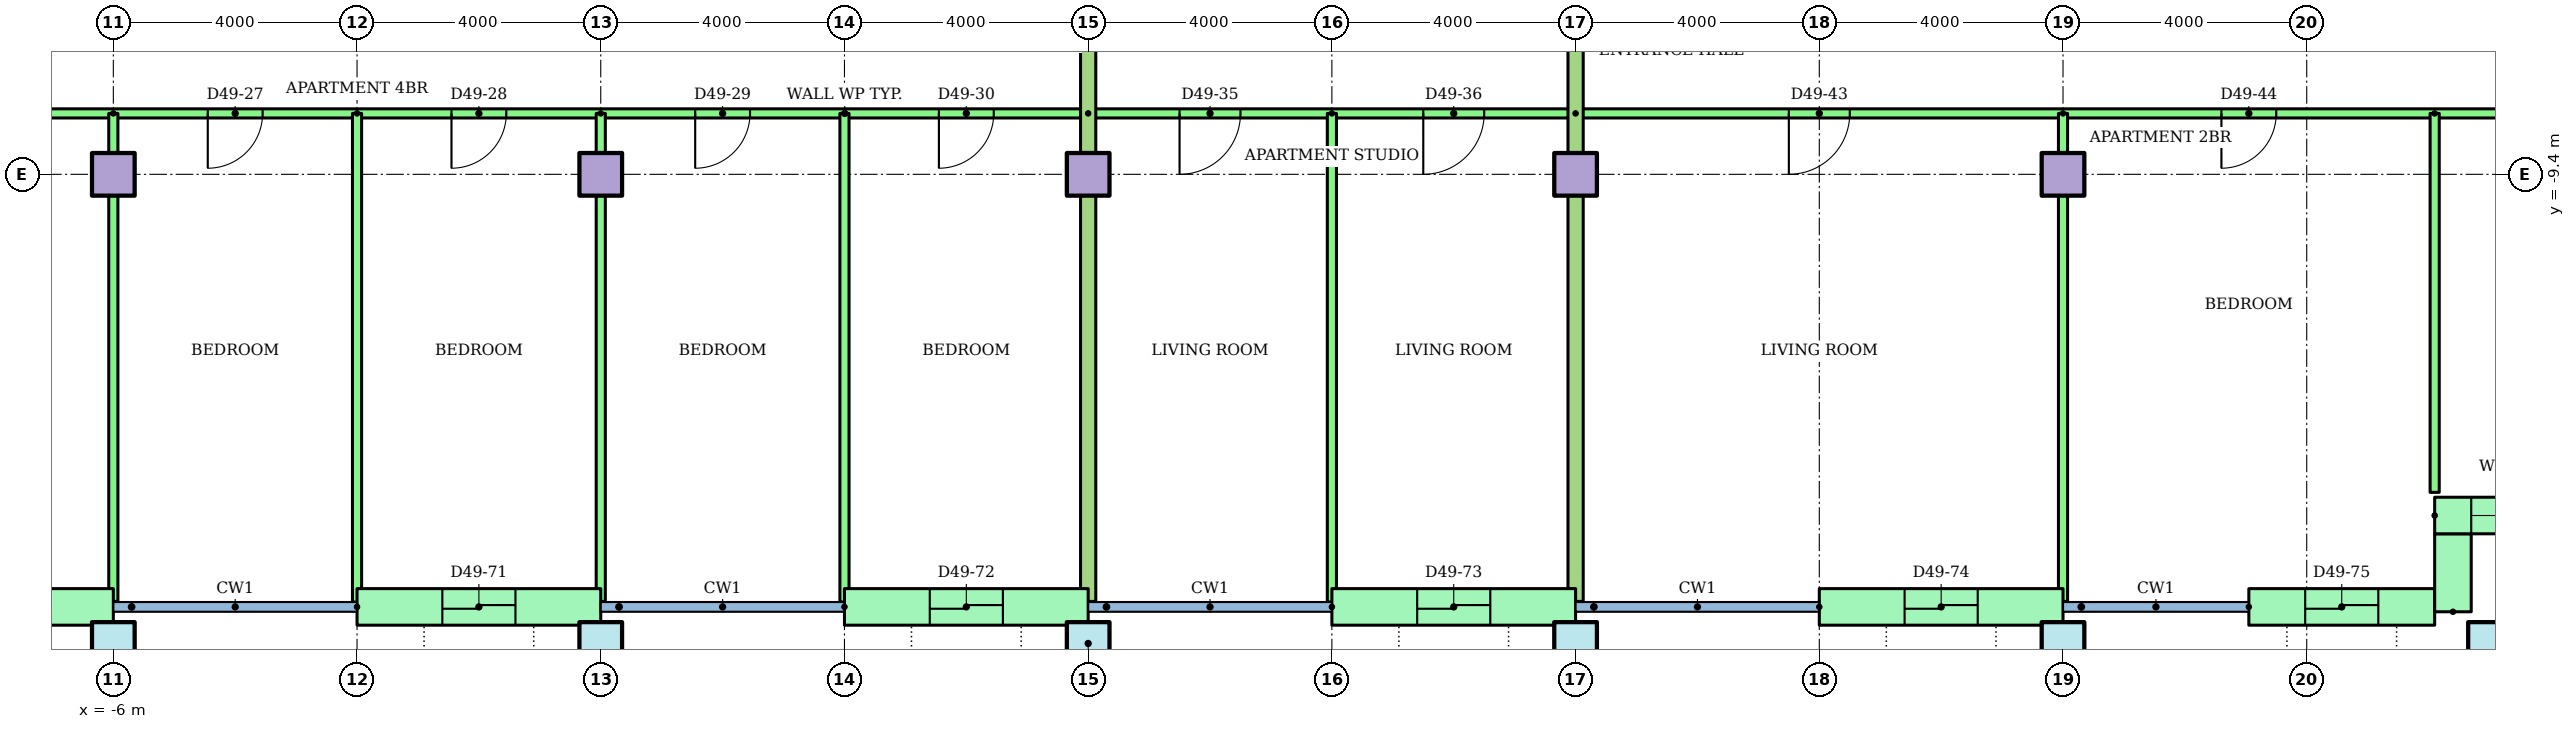
"""IFC4 building model, lengths in metres.
Left out: names, types, materials, properties, quantities, classifications, styles, units other than length and angle.
Written with IfcOpenShell. Run it as: python <this file> out.ifc"""

import sys

from ifc_helpers import new_model, si_unit, direction, frame, frame_2d, origin, origin_2d, place, context, subcontext, project, spatial, rectangle, hollow_rectangle, extrude, element, fill, save


model = new_model("IFC4")
c1 = context("Model", 3, precision=1e-05, world=origin(), true_north=direction((0.0, 1.0)))
c2 = subcontext(c1, "Body", "Model", "MODEL_VIEW")
j1 = project(units=[si_unit("LENGTHUNIT", "METRE"), si_unit("PLANEANGLEUNIT", "RADIAN")], contexts=[c1])
p1 = place(None, origin())
s1 = spatial("IfcSite", under=j1, at=p1, CompositionType="ELEMENT")
p2 = place(p1, origin())
s2 = spatial("IfcBuilding", under=s1, at=p2, CompositionType="ELEMENT")
p3 = place(p2, frame((0.0, 0.0, 187.7)))
s3 = spatial("IfcBuildingStorey", under=s2, at=p3, CompositionType="ELEMENT", Elevation=187.7)
for number, where in (
    (1, (-6.0, -17.1, 0.0)),
    (2, (2.0, -17.1, 0.0)),
    (3, (10.0, -17.1, 0.0)),
    (4, (18.0, -17.1, 0.0)),
    (5, (26.0, -17.1, 0.0)),
    (6, (33.0, -17.1, 0.0)),
):
    element("IfcColumn", number, at=place(p3, frame(where)), inside=s3, PredefinedType="COLUMN", context=c2, shape_type="SweptSolid", body=[
        extrude(hollow_rectangle(XDim=0.7, YDim=0.7, WallThickness=0.036, at=origin_2d()), origin(), (0.0, 0.0, 1.0), 3.2),
    ])
for number, where in (
    (7, (-6.0, -9.4, 0.0)),
    (8, (2.0, -9.4, 0.0)),
    (9, (10.0, -9.4, 0.0)),
    (10, (18.0, -9.4, 0.0)),
    (11, (26.0, -9.4, 0.0)),
):
    element("IfcColumn", number, at=place(p3, frame(where)), inside=s3, PredefinedType="COLUMN", context=c2, shape_type="SweptSolid", body=[
        extrude(rectangle(XDim=0.7, YDim=0.7, at=origin_2d()), origin(), (0.0, 0.0, 1.0), 3.2),
    ])
p4 = place(p3, frame((-10.0, -16.5, 0.0)))
e12 = element("IfcWall", 12, at=p4, inside=s3, PredefinedType="STANDARD", context=c2, shape_type="SweptSolid", body=[
    extrude(rectangle(XDim=4.0, YDim=0.6, at=frame_2d((2.0, 0.0))), origin(), (0.0, 0.0, 1.0), 2.92),
])
p5 = place(p4, frame((1.4, 0.0, 0.0)))
e13 = element("IfcOpeningElement", 13, at=p5, cuts=e12, PredefinedType="OPENING", context=c2, shape_type="SweptSolid", body=[
    extrude(rectangle(XDim=1.2, YDim=2.1, at=frame_2d((0.6, 1.05))), frame((0.0, 0.31, 0.0), z_axis=(0.0, -1.0, 0.0), x_axis=(1.0, 0.0, 0.0)), (0.0, 0.0, 1.0), 0.62),
])
p6 = place(p3, frame((-2.0, -16.5, 0.0)))
e14 = element("IfcWall", 14, at=p6, inside=s3, PredefinedType="STANDARD", context=c2, shape_type="SweptSolid", body=[
    extrude(rectangle(XDim=4.0, YDim=0.6, at=frame_2d((2.0, 0.0))), origin(), (0.0, 0.0, 1.0), 2.92),
])
p7 = place(p6, frame((1.4, 0.0, 0.0)))
e15 = element("IfcOpeningElement", 15, at=p7, cuts=e14, PredefinedType="OPENING", context=c2, shape_type="SweptSolid", body=[
    extrude(rectangle(XDim=1.2, YDim=2.1, at=frame_2d((0.6, 1.05))), frame((0.0, 0.31, 0.0), z_axis=(0.0, -1.0, 0.0), x_axis=(1.0, 0.0, 0.0)), (0.0, 0.0, 1.0), 0.62),
])
p8 = place(p3, frame((6.0, -16.5, 0.0)))
e16 = element("IfcWall", 16, at=p8, inside=s3, PredefinedType="STANDARD", context=c2, shape_type="SweptSolid", body=[
    extrude(rectangle(XDim=4.0, YDim=0.6, at=frame_2d((2.0, 0.0))), origin(), (0.0, 0.0, 1.0), 2.92),
])
p9 = place(p8, frame((1.4, 0.0, 0.0)))
e17 = element("IfcOpeningElement", 17, at=p9, cuts=e16, PredefinedType="OPENING", context=c2, shape_type="SweptSolid", body=[
    extrude(rectangle(XDim=1.2, YDim=2.1, at=frame_2d((0.6, 1.05))), frame((0.0, 0.31, 0.0), z_axis=(0.0, -1.0, 0.0), x_axis=(1.0, 0.0, 0.0)), (0.0, 0.0, 1.0), 0.62),
])
p10 = place(p3, frame((14.0, -16.5, 0.0)))
e18 = element("IfcWall", 18, at=p10, inside=s3, PredefinedType="STANDARD", context=c2, shape_type="SweptSolid", body=[
    extrude(rectangle(XDim=4.0, YDim=0.6, at=frame_2d((2.0, 0.0))), origin(), (0.0, 0.0, 1.0), 2.92),
])
p11 = place(p10, frame((1.4, 0.0, 0.0)))
e19 = element("IfcOpeningElement", 19, at=p11, cuts=e18, PredefinedType="OPENING", context=c2, shape_type="SweptSolid", body=[
    extrude(rectangle(XDim=1.2, YDim=2.1, at=frame_2d((0.6, 1.05))), frame((0.0, 0.31, 0.0), z_axis=(0.0, -1.0, 0.0), x_axis=(1.0, 0.0, 0.0)), (0.0, 0.0, 1.0), 0.62),
])
p12 = place(p3, frame((22.0, -16.5, 0.0)))
e20 = element("IfcWall", 20, at=p12, inside=s3, PredefinedType="STANDARD", context=c2, shape_type="SweptSolid", body=[
    extrude(rectangle(XDim=4.0, YDim=0.6, at=frame_2d((2.0, 0.0))), origin(), (0.0, 0.0, 1.0), 2.92),
])
p13 = place(p12, frame((1.4, 0.0, 0.0)))
e21 = element("IfcOpeningElement", 21, at=p13, cuts=e20, PredefinedType="OPENING", context=c2, shape_type="SweptSolid", body=[
    extrude(rectangle(XDim=1.2, YDim=2.1, at=frame_2d((0.6, 1.05))), frame((0.0, 0.31, 0.0), z_axis=(0.0, -1.0, 0.0), x_axis=(1.0, 0.0, 0.0)), (0.0, 0.0, 1.0), 0.62),
])
p14 = place(p3, frame((29.05, -16.5, 0.0)))
e22 = element("IfcWall", 22, at=p14, inside=s3, PredefinedType="STANDARD", context=c2, shape_type="SweptSolid", body=[
    extrude(rectangle(XDim=3.05, YDim=0.6, at=frame_2d((1.525, 0.0))), origin(), (0.0, 0.0, 1.0), 2.92),
])
p15 = place(p14, frame((0.925, 0.0, 0.0)))
e23 = element("IfcOpeningElement", 23, at=p15, cuts=e22, PredefinedType="OPENING", context=c2, shape_type="SweptSolid", body=[
    extrude(rectangle(XDim=1.2, YDim=2.1, at=frame_2d((0.6, 1.05))), frame((0.0, 0.31, 0.0), z_axis=(0.0, -1.0, 0.0), x_axis=(1.0, 0.0, 0.0)), (0.0, 0.0, 1.0), 0.62),
])
p16 = place(p3, frame((32.4, -16.58, 0.0), z_axis=(0.0, 0.0, 1.0), x_axis=(0.0, 1.0, 0.0)))
e24 = element("IfcWall", 24, at=p16, inside=s3, PredefinedType="STANDARD", context=c2, shape_type="SweptSolid", body=[
    extrude(rectangle(XDim=1.28, YDim=0.6, at=frame_2d((0.64, 0.0))), origin(), (0.0, 0.0, 1.0), 2.92),
])
p17 = place(p3, frame((32.1, -15.0, 0.0)))
e25 = element("IfcWall", 25, at=p17, inside=s3, PredefinedType="STANDARD", context=c2, shape_type="SweptSolid", body=[
    extrude(rectangle(XDim=2.1, YDim=0.6, at=frame_2d((1.05, 0.0))), origin(), (0.0, 0.0, 1.0), 2.92),
])
p18 = place(p17, frame((0.6, 0.0, 0.9)))
e26 = element("IfcOpeningElement", 26, at=p18, cuts=e25, PredefinedType="OPENING", context=c2, shape_type="SweptSolid", body=[
    extrude(rectangle(XDim=0.9, YDim=1.5, at=frame_2d((0.45, 0.75))), frame((0.0, 0.31, 0.0), z_axis=(0.0, -1.0, 0.0), x_axis=(1.0, 0.0, 0.0)), (0.0, 0.0, 1.0), 0.62),
])
p19 = place(p3, frame((10.0, -8.4, 0.0), z_axis=(0.0, 0.0, 1.0), x_axis=(-1.0, 0.0, 0.0)))
e27 = element("IfcWall", 27, at=p19, inside=s3, PredefinedType="PARTITIONING", context=c2, shape_type="SweptSolid", body=[
    extrude(rectangle(XDim=24.0, YDim=0.15, at=frame_2d((12.0, 0.0))), origin(), (0.0, 0.0, 1.0), 2.4),
])
p20 = place(p19, frame((19.5, 0.0, 0.0)))
e28 = element("IfcOpeningElement", 28, at=p20, cuts=e27, PredefinedType="OPENING", context=c2, shape_type="SweptSolid", body=[
    extrude(rectangle(XDim=1.0, YDim=2.1, at=frame_2d((0.5, 1.05))), frame((0.0, 0.085, 0.0), z_axis=(0.0, -1.0, 0.0), x_axis=(1.0, 0.0, 0.0)), (0.0, 0.0, 1.0), 0.17),
])
p21 = place(p19, frame((13.55, 0.0, 0.0)))
e29 = element("IfcOpeningElement", 29, at=p21, cuts=e27, PredefinedType="OPENING", context=c2, shape_type="SweptSolid", body=[
    extrude(rectangle(XDim=0.9, YDim=2.1, at=frame_2d((0.45, 1.05))), frame((0.0, 0.085, 0.0), z_axis=(0.0, -1.0, 0.0), x_axis=(1.0, 0.0, 0.0)), (0.0, 0.0, 1.0), 0.17),
])
p22 = place(p19, frame((9.55, 0.0, 0.0)))
e30 = element("IfcOpeningElement", 30, at=p22, cuts=e27, PredefinedType="OPENING", context=c2, shape_type="SweptSolid", body=[
    extrude(rectangle(XDim=0.9, YDim=2.1, at=frame_2d((0.45, 1.05))), frame((0.0, 0.085, 0.0), z_axis=(0.0, -1.0, 0.0), x_axis=(1.0, 0.0, 0.0)), (0.0, 0.0, 1.0), 0.17),
])
p23 = place(p19, frame((5.55, 0.0, 0.0)))
e31 = element("IfcOpeningElement", 31, at=p23, cuts=e27, PredefinedType="OPENING", context=c2, shape_type="SweptSolid", body=[
    extrude(rectangle(XDim=0.9, YDim=2.1, at=frame_2d((0.45, 1.05))), frame((0.0, 0.085, 0.0), z_axis=(0.0, -1.0, 0.0), x_axis=(1.0, 0.0, 0.0)), (0.0, 0.0, 1.0), 0.17),
])
p24 = place(p19, frame((1.55, 0.0, 0.0)))
e32 = element("IfcOpeningElement", 32, at=p24, cuts=e27, PredefinedType="OPENING", context=c2, shape_type="SweptSolid", body=[
    extrude(rectangle(XDim=0.9, YDim=2.1, at=frame_2d((0.45, 1.05))), frame((0.0, 0.085, 0.0), z_axis=(0.0, -1.0, 0.0), x_axis=(1.0, 0.0, 0.0)), (0.0, 0.0, 1.0), 0.17),
])
p25 = place(p3, frame((-6.0, -8.4, 0.0), z_axis=(0.0, 0.0, 1.0), x_axis=(0.0, -1.0, 0.0)))
e33 = element("IfcWall", 33, at=p25, inside=s3, PredefinedType="PARTITIONING", context=c2, shape_type="SweptSolid", body=[
    extrude(rectangle(XDim=8.01, YDim=0.15, at=frame_2d((4.005, 0.0))), origin(), (0.0, 0.0, 1.0), 2.4),
])
p26 = place(p3, frame((-2.0, -8.4, 0.0), z_axis=(0.0, 0.0, 1.0), x_axis=(0.0, -1.0, 0.0)))
e34 = element("IfcWall", 34, at=p26, inside=s3, PredefinedType="PARTITIONING", context=c2, shape_type="SweptSolid", body=[
    extrude(rectangle(XDim=8.021, YDim=0.15, at=frame_2d((4.01, 0.0))), origin(), (0.0, 0.0, 1.0), 2.4),
])
p27 = place(p3, frame((2.0, -8.4, 0.0), z_axis=(0.0, 0.0, 1.0), x_axis=(0.0, -1.0, 0.0)))
e35 = element("IfcWall", 35, at=p27, inside=s3, PredefinedType="PARTITIONING", context=c2, shape_type="SweptSolid", body=[
    extrude(rectangle(XDim=8.01, YDim=0.15, at=frame_2d((4.005, 0.0))), origin(), (0.0, 0.0, 1.0), 2.4),
])
p28 = place(p3, frame((6.0, -8.4, 0.0), z_axis=(0.0, 0.0, 1.0), x_axis=(0.0, -1.0, 0.0)))
e36 = element("IfcWall", 36, at=p28, inside=s3, PredefinedType="PARTITIONING", context=c2, shape_type="SweptSolid", body=[
    extrude(rectangle(XDim=8.021, YDim=0.15, at=frame_2d((4.01, 0.0))), origin(), (0.0, 0.0, 1.0), 2.4),
])
p29 = place(p3, frame((18.0, -8.4, 0.0), z_axis=(0.0, 0.0, 1.0), x_axis=(-1.0, 0.0, 0.0)))
e37 = element("IfcWall", 37, at=p29, inside=s3, PredefinedType="PARTITIONING", context=c2, shape_type="SweptSolid", body=[
    extrude(rectangle(XDim=8.0, YDim=0.15, at=frame_2d((4.0, 0.0))), origin(), (0.0, 0.0, 1.0), 2.4),
])
p30 = place(p29, frame((5.5, 0.0, 0.0)))
e38 = element("IfcOpeningElement", 38, at=p30, cuts=e37, PredefinedType="OPENING", context=c2, shape_type="SweptSolid", body=[
    extrude(rectangle(XDim=1.0, YDim=2.1, at=frame_2d((0.5, 1.05))), frame((0.0, 0.085, 0.0), z_axis=(0.0, -1.0, 0.0), x_axis=(1.0, 0.0, 0.0)), (0.0, 0.0, 1.0), 0.17),
])
p31 = place(p29, frame((1.5, 0.0, 0.0)))
e39 = element("IfcOpeningElement", 39, at=p31, cuts=e37, PredefinedType="OPENING", context=c2, shape_type="SweptSolid", body=[
    extrude(rectangle(XDim=1.0, YDim=2.1, at=frame_2d((0.5, 1.05))), frame((0.0, 0.085, 0.0), z_axis=(0.0, -1.0, 0.0), x_axis=(1.0, 0.0, 0.0)), (0.0, 0.0, 1.0), 0.17),
])
p32 = place(p3, frame((14.0, -8.4, 0.0), z_axis=(0.0, 0.0, 1.0), x_axis=(0.0, -1.0, 0.0)))
e40 = element("IfcWall", 40, at=p32, inside=s3, PredefinedType="PARTITIONING", context=c2, shape_type="SweptSolid", body=[
    extrude(rectangle(XDim=8.021, YDim=0.15, at=frame_2d((4.01, 0.0))), origin(), (0.0, 0.0, 1.0), 2.4),
])
p33 = place(p3, frame((10.0, -1.4, 0.0), z_axis=(0.0, 0.0, 1.0), x_axis=(0.0, -1.0, 0.0)))
e41 = element("IfcWall", 41, at=p33, inside=s3, PredefinedType="PARTITIONING", context=c2, shape_type="SweptSolid", body=[
    extrude(rectangle(XDim=15.01, YDim=0.25, at=frame_2d((7.505, 0.0))), origin(), (0.0, 0.0, 1.0), 2.4),
])
p34 = place(p3, frame((36.82, -8.4, 0.0), z_axis=(0.0, 0.0, 1.0), x_axis=(-1.0, 0.0, 0.0)))
e42 = element("IfcWall", 42, at=p34, inside=s3, PredefinedType="PARTITIONING", context=c2, shape_type="SweptSolid", body=[
    extrude(rectangle(XDim=18.82, YDim=0.15, at=frame_2d((9.41, 0.0))), origin(), (0.0, 0.0, 1.0), 2.4),
])
p35 = place(p34, frame((14.32, 0.0, 0.0)))
e43 = element("IfcOpeningElement", 43, at=p35, cuts=e42, PredefinedType="OPENING", context=c2, shape_type="SweptSolid", body=[
    extrude(rectangle(XDim=1.0, YDim=2.1, at=frame_2d((0.5, 1.05))), frame((0.0, 0.085, 0.0), z_axis=(0.0, -1.0, 0.0), x_axis=(1.0, 0.0, 0.0)), (0.0, 0.0, 1.0), 0.17),
])
p36 = place(p34, frame((7.32, 0.0, 0.0)))
e44 = element("IfcOpeningElement", 44, at=p36, cuts=e42, PredefinedType="OPENING", context=c2, shape_type="SweptSolid", body=[
    extrude(rectangle(XDim=0.9, YDim=2.1, at=frame_2d((0.45, 1.05))), frame((0.0, 0.085, 0.0), z_axis=(0.0, -1.0, 0.0), x_axis=(1.0, 0.0, 0.0)), (0.0, 0.0, 1.0), 0.17),
])
p37 = place(p34, frame((1.373, 0.0, 0.0)))
e45 = element("IfcOpeningElement", 45, at=p37, cuts=e42, PredefinedType="OPENING", context=c2, shape_type="SweptSolid", body=[
    extrude(rectangle(XDim=0.9, YDim=2.1, at=frame_2d((0.45, 1.05))), frame((0.0, 0.085, 0.0), z_axis=(0.0, -1.0, 0.0), x_axis=(1.0, 0.0, 0.0)), (0.0, 0.0, 1.0), 0.17),
])
p38 = place(p3, frame((26.0, -8.4, 0.0), z_axis=(0.0, 0.0, 1.0), x_axis=(0.0, -1.0, 0.0)))
e46 = element("IfcWall", 46, at=p38, inside=s3, PredefinedType="PARTITIONING", context=c2, shape_type="SweptSolid", body=[
    extrude(rectangle(XDim=8.01, YDim=0.15, at=frame_2d((4.005, 0.0))), origin(), (0.0, 0.0, 1.0), 2.4),
])
p39 = place(p3, frame((32.1, -8.4, 0.0), z_axis=(0.0, 0.0, 1.0), x_axis=(0.0, -1.0, 0.0)))
e47 = element("IfcWall", 47, at=p39, inside=s3, PredefinedType="PARTITIONING", context=c2, shape_type="SweptSolid", body=[
    extrude(rectangle(XDim=6.22, YDim=0.15, at=frame_2d((3.11, 0.0))), origin(), (0.0, 0.0, 1.0), 2.4),
])
p40 = place(p3, frame((18.0, -1.4, 0.0), z_axis=(0.0, 0.0, 1.0), x_axis=(0.0, -1.0, 0.0)))
e48 = element("IfcWall", 48, at=p40, inside=s3, PredefinedType="PARTITIONING", context=c2, shape_type="SweptSolid", body=[
    extrude(rectangle(XDim=15.01, YDim=0.25, at=frame_2d((7.505, 0.0))), origin(), (0.0, 0.0, 1.0), 2.4),
])
p41 = place(p18, origin())
e49 = element("IfcWindow", 49, at=p41, inside=s3, PartitioningType="SINGLE_PANEL", PredefinedType="WINDOW", context=c2, shape_type="SweptSolid", body=[
    extrude(rectangle(XDim=0.9, YDim=1.5, at=frame_2d((0.45, 0.75))), frame((0.0, 0.03, 0.0), z_axis=(0.0, -1.0, 0.0), x_axis=(1.0, 0.0, 0.0)), (0.0, 0.0, 1.0), 0.06),
])
fill(e26, e49)
p42 = place(p21, origin())
e50 = element("IfcDoor", 50, at=p42, inside=s3, OperationType="SINGLE_SWING_RIGHT", PredefinedType="DOOR", context=c2, shape_type="SweptSolid", body=[
    extrude(rectangle(XDim=0.9, YDim=2.1, at=frame_2d((0.45, 1.05))), frame((0.0, 0.025, 0.0), z_axis=(0.0, -1.0, 0.0), x_axis=(1.0, 0.0, 0.0)), (0.0, 0.0, 1.0), 0.05),
])
fill(e29, e50)
p43 = place(p22, origin())
e51 = element("IfcDoor", 51, at=p43, inside=s3, OperationType="SINGLE_SWING_RIGHT", PredefinedType="DOOR", context=c2, shape_type="SweptSolid", body=[
    extrude(rectangle(XDim=0.9, YDim=2.1, at=frame_2d((0.45, 1.05))), frame((0.0, 0.025, 0.0), z_axis=(0.0, -1.0, 0.0), x_axis=(1.0, 0.0, 0.0)), (0.0, 0.0, 1.0), 0.05),
])
fill(e30, e51)
p44 = place(p23, origin())
e52 = element("IfcDoor", 52, at=p44, inside=s3, OperationType="SINGLE_SWING_RIGHT", PredefinedType="DOOR", context=c2, shape_type="SweptSolid", body=[
    extrude(rectangle(XDim=0.9, YDim=2.1, at=frame_2d((0.45, 1.05))), frame((0.0, 0.025, 0.0), z_axis=(0.0, -1.0, 0.0), x_axis=(1.0, 0.0, 0.0)), (0.0, 0.0, 1.0), 0.05),
])
fill(e31, e52)
p45 = place(p24, origin())
e53 = element("IfcDoor", 53, at=p45, inside=s3, OperationType="SINGLE_SWING_RIGHT", PredefinedType="DOOR", context=c2, shape_type="SweptSolid", body=[
    extrude(rectangle(XDim=0.9, YDim=2.1, at=frame_2d((0.45, 1.05))), frame((0.0, 0.025, 0.0), z_axis=(0.0, -1.0, 0.0), x_axis=(1.0, 0.0, 0.0)), (0.0, 0.0, 1.0), 0.05),
])
fill(e32, e53)
p46 = place(p30, origin())
e54 = element("IfcDoor", 54, at=p46, inside=s3, OperationType="SINGLE_SWING_RIGHT", PredefinedType="DOOR", context=c2, shape_type="SweptSolid", body=[
    extrude(rectangle(XDim=1.0, YDim=2.1, at=frame_2d((0.5, 1.05))), frame((0.0, 0.025, 0.0), z_axis=(0.0, -1.0, 0.0), x_axis=(1.0, 0.0, 0.0)), (0.0, 0.0, 1.0), 0.05),
])
fill(e38, e54)
p47 = place(p31, origin())
e55 = element("IfcDoor", 55, at=p47, inside=s3, OperationType="SINGLE_SWING_RIGHT", PredefinedType="DOOR", context=c2, shape_type="SweptSolid", body=[
    extrude(rectangle(XDim=1.0, YDim=2.1, at=frame_2d((0.5, 1.05))), frame((0.0, 0.025, 0.0), z_axis=(0.0, -1.0, 0.0), x_axis=(1.0, 0.0, 0.0)), (0.0, 0.0, 1.0), 0.05),
])
fill(e39, e55)
p48 = place(p35, origin())
e56 = element("IfcDoor", 56, at=p48, inside=s3, OperationType="SINGLE_SWING_RIGHT", PredefinedType="DOOR", context=c2, shape_type="SweptSolid", body=[
    extrude(rectangle(XDim=1.0, YDim=2.1, at=frame_2d((0.5, 1.05))), frame((0.0, 0.025, 0.0), z_axis=(0.0, -1.0, 0.0), x_axis=(1.0, 0.0, 0.0)), (0.0, 0.0, 1.0), 0.05),
])
fill(e43, e56)
p49 = place(p36, origin())
e57 = element("IfcDoor", 57, at=p49, inside=s3, OperationType="SINGLE_SWING_RIGHT", PredefinedType="DOOR", context=c2, shape_type="SweptSolid", body=[
    extrude(rectangle(XDim=0.9, YDim=2.1, at=frame_2d((0.45, 1.05))), frame((0.0, 0.025, 0.0), z_axis=(0.0, -1.0, 0.0), x_axis=(1.0, 0.0, 0.0)), (0.0, 0.0, 1.0), 0.05),
])
fill(e44, e57)
p50 = place(p7, origin())
e58 = element("IfcDoor", 58, at=p50, inside=s3, OperationType="SLIDING_TO_LEFT", PredefinedType="DOOR", context=c2, shape_type="SweptSolid", body=[
    extrude(rectangle(XDim=1.2, YDim=2.1, at=frame_2d((0.6, 1.05))), frame((0.0, 0.025, 0.0), z_axis=(0.0, -1.0, 0.0), x_axis=(1.0, 0.0, 0.0)), (0.0, 0.0, 1.0), 0.05),
])
fill(e15, e58)
p51 = place(p9, origin())
e59 = element("IfcDoor", 59, at=p51, inside=s3, OperationType="SLIDING_TO_LEFT", PredefinedType="DOOR", context=c2, shape_type="SweptSolid", body=[
    extrude(rectangle(XDim=1.2, YDim=2.1, at=frame_2d((0.6, 1.05))), frame((0.0, 0.025, 0.0), z_axis=(0.0, -1.0, 0.0), x_axis=(1.0, 0.0, 0.0)), (0.0, 0.0, 1.0), 0.05),
])
fill(e17, e59)
p52 = place(p11, origin())
e60 = element("IfcDoor", 60, at=p52, inside=s3, OperationType="SLIDING_TO_LEFT", PredefinedType="DOOR", context=c2, shape_type="SweptSolid", body=[
    extrude(rectangle(XDim=1.2, YDim=2.1, at=frame_2d((0.6, 1.05))), frame((0.0, 0.025, 0.0), z_axis=(0.0, -1.0, 0.0), x_axis=(1.0, 0.0, 0.0)), (0.0, 0.0, 1.0), 0.05),
])
fill(e19, e60)
p53 = place(p13, origin())
e61 = element("IfcDoor", 61, at=p53, inside=s3, OperationType="SLIDING_TO_LEFT", PredefinedType="DOOR", context=c2, shape_type="SweptSolid", body=[
    extrude(rectangle(XDim=1.2, YDim=2.1, at=frame_2d((0.6, 1.05))), frame((0.0, 0.025, 0.0), z_axis=(0.0, -1.0, 0.0), x_axis=(1.0, 0.0, 0.0)), (0.0, 0.0, 1.0), 0.05),
])
fill(e21, e61)
p54 = place(p15, origin())
e62 = element("IfcDoor", 62, at=p54, inside=s3, OperationType="SLIDING_TO_LEFT", PredefinedType="DOOR", context=c2, shape_type="SweptSolid", body=[
    extrude(rectangle(XDim=1.2, YDim=2.1, at=frame_2d((0.6, 1.05))), frame((0.0, 0.025, 0.0), z_axis=(0.0, -1.0, 0.0), x_axis=(1.0, 0.0, 0.0)), (0.0, 0.0, 1.0), 0.05),
])
fill(e23, e62)
save(model, sys.argv[1])
